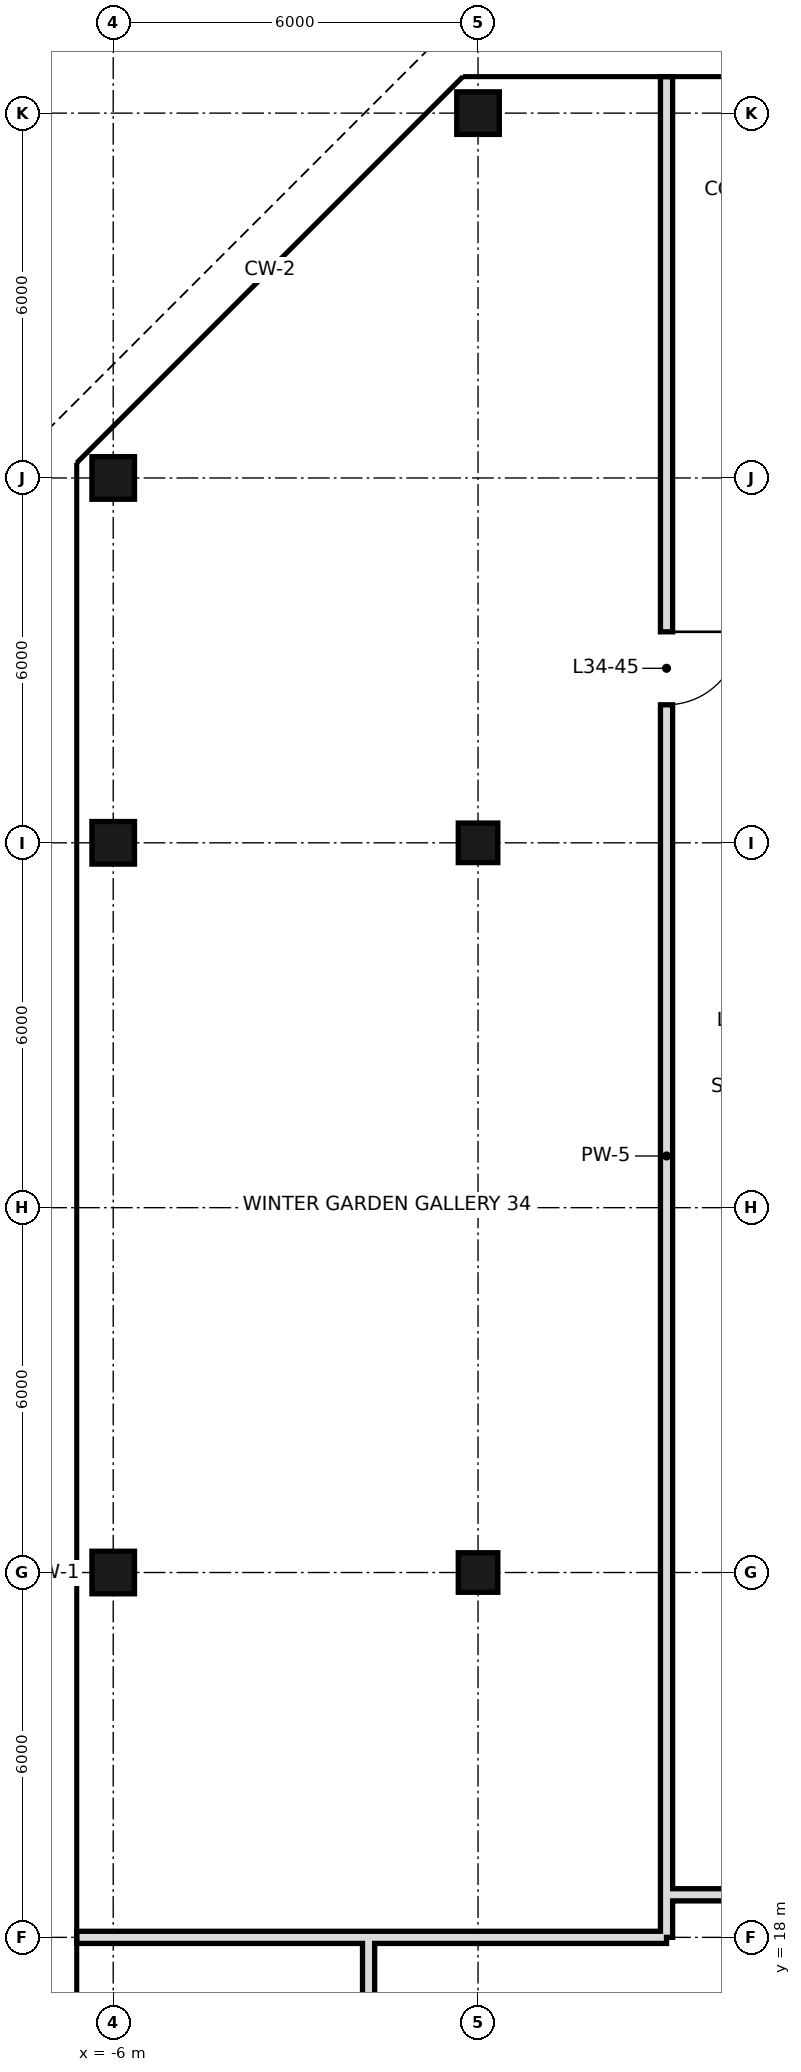
"""IFC4 building model, lengths in metres.
Left out: names, types, materials, properties, quantities, classifications, styles, units other than length and angle.
Written with IfcOpenShell. Run it as: python <this file> out.ifc"""

import sys

from ifc_helpers import new_model, si_unit, direction, frame, frame_2d, origin, origin_2d, place, context, subcontext, project, spatial, rectangle, hollow_rectangle, extrude, element, fill, save


model = new_model("IFC4")
c1 = context("Model", 3, precision=1e-05, world=origin(), true_north=direction((0.0, 1.0)))
c2 = subcontext(c1, "Body", "Model", "MODEL_VIEW")
j1 = project(units=[si_unit("LENGTHUNIT", "METRE"), si_unit("PLANEANGLEUNIT", "RADIAN")], contexts=[c1])
p1 = place(None, origin())
s1 = spatial("IfcSite", under=j1, at=p1, CompositionType="ELEMENT")
p2 = place(p1, origin())
s2 = spatial("IfcBuilding", under=s1, at=p2, CompositionType="ELEMENT")
p3 = place(p2, frame((0.0, 0.0, 151.0)))
s3 = spatial("IfcBuildingStorey", under=s2, at=p3, CompositionType="ELEMENT", Elevation=151.0)
for number, where, z_axis, x_axis in (
    (1, (-6.0, 24.0, 0.0), (0.0, 0.0, 1.0), (1.0, 0.0, 0.0)),
    (2, (-6.0, 36.0, 0.0), (0.0, 0.0, 1.0), (1.0, 0.0, 0.0)),
    (3, (-6.0, 42.0, 0.0), (0.0, 0.0, 1.0), (1.0, 0.0, 0.0)),
):
    element("IfcColumn", number, at=place(p3, frame(where, z_axis=z_axis, x_axis=x_axis)), inside=s3, PredefinedType="COLUMN", context=c2, shape_type="SweptSolid", body=[
        extrude(hollow_rectangle(XDim=0.7, YDim=0.7, WallThickness=0.036, at=origin_2d()), origin(), (0.0, 0.0, 1.0), 3.6),
    ])
for number, where, z_axis, x_axis in (
    (4, (0.0, 24.0, 0.0), (0.0, 0.0, 1.0), (1.0, 0.0, 0.0)),
    (5, (0.0, 36.0, 0.0), (0.0, 0.0, 1.0), (1.0, 0.0, 0.0)),
):
    element("IfcColumn", number, at=place(p3, frame(where, z_axis=z_axis, x_axis=x_axis)), inside=s3, PredefinedType="COLUMN", context=c2, shape_type="SweptSolid", body=[
        extrude(hollow_rectangle(XDim=0.65, YDim=0.65, WallThickness=0.032, at=origin_2d()), origin(), (0.0, 0.0, 1.0), 3.6),
    ])
p4 = place(p3, frame((0.0, 48.0, 0.0), z_axis=(0.0, 0.0, 1.0), x_axis=(1.0, 0.0, 0.0)))
e6 = element("IfcColumn", 6, at=p4, inside=s3, PredefinedType="COLUMN", context=c2, shape_type="SweptSolid", body=[
    extrude(hollow_rectangle(XDim=0.7, YDim=0.7, WallThickness=0.036, at=origin_2d()), origin(), (0.0, 0.0, 1.0), 3.6),
])
p5 = place(p3, frame((-1.8, 10.8, 0.0), z_axis=(0.0, 0.0, 1.0), x_axis=(0.0, 1.0, 0.0)))
e7 = element("IfcWall", 7, at=p5, inside=s3, PredefinedType="SOLIDWALL", context=c2, shape_type="SweptSolid", body=[
    extrude(rectangle(XDim=7.2, YDim=0.2, at=frame_2d((3.6, 0.0))), origin(), (0.0, 0.0, 1.0), 3.42),
])
p6 = place(p3, frame((3.1, 18.0, 0.0), z_axis=(0.0, 0.0, 1.0), x_axis=(0.0, 1.0, 0.0)))
e8 = element("IfcWall", 8, at=p6, inside=s3, PredefinedType="SOLIDWALL", context=c2, shape_type="SweptSolid", body=[
    extrude(rectangle(XDim=30.6, YDim=0.2, at=frame_2d((15.3, 0.0))), origin(), (0.0, 0.0, 1.0), 2.72),
])
p7 = place(p6, frame((20.27, 0.0, 0.0)))
e9 = element("IfcOpeningElement", 9, at=p7, cuts=e8, PredefinedType="OPENING", context=c2, shape_type="SweptSolid", body=[
    extrude(rectangle(XDim=1.2, YDim=2.4, at=frame_2d((0.6, 1.2))), frame((0.0, 0.11, 0.0), z_axis=(0.0, -1.0, 0.0), x_axis=(1.0, 0.0, 0.0)), (0.0, 0.0, 1.0), 0.22),
])
p8 = place(p3, frame((-1.8, 18.0, 0.0), z_axis=(0.0, 0.0, 1.0), x_axis=(1.0, 0.0, 0.0)))
e10 = element("IfcWall", 10, at=p8, inside=s3, PredefinedType="SOLIDWALL", context=c2, shape_type="SweptSolid", body=[
    extrude(rectangle(XDim=4.9, YDim=0.2, at=frame_2d((2.45, 0.0))), origin(), (0.0, 0.0, 1.0), 2.72),
])
p9 = place(p3, frame((-6.6, 18.0, 0.0), z_axis=(0.0, 0.0, 1.0), x_axis=(1.0, 0.0, 0.0)))
e11 = element("IfcWall", 11, at=p9, inside=s3, PredefinedType="SOLIDWALL", context=c2, shape_type="SweptSolid", body=[
    extrude(rectangle(XDim=4.8, YDim=0.2, at=frame_2d((2.4, 0.0))), origin(), (0.0, 0.0, 1.0), 2.72),
])
p10 = place(p3, frame((3.1, 18.7, 0.0), z_axis=(0.0, 0.0, 1.0), x_axis=(1.0, 0.0, 0.0)))
e12 = element("IfcWall", 12, at=p10, inside=s3, PredefinedType="SOLIDWALL", context=c2, shape_type="SweptSolid", body=[
    extrude(rectangle(XDim=41.8, YDim=0.2, at=frame_2d((20.9, 0.0))), origin(), (0.0, 0.0, 1.0), 2.72),
])
p11 = place(p10, frame((5.64, 0.0, 0.0)))
e13 = element("IfcOpeningElement", 13, at=p11, cuts=e12, PredefinedType="OPENING", context=c2, shape_type="SweptSolid", body=[
    extrude(rectangle(XDim=1.2, YDim=2.4, at=frame_2d((0.6, 1.2))), frame((0.0, 0.11, 0.0), z_axis=(0.0, -1.0, 0.0), x_axis=(1.0, 0.0, 0.0)), (0.0, 0.0, 1.0), 0.22),
])
p12 = place(p10, frame((24.16, 0.0, 0.0)))
e14 = element("IfcOpeningElement", 14, at=p12, cuts=e12, PredefinedType="OPENING", context=c2, shape_type="SweptSolid", body=[
    extrude(rectangle(XDim=1.2, YDim=2.4, at=frame_2d((0.6, 1.2))), frame((0.0, 0.11, 0.0), z_axis=(0.0, -1.0, 0.0), x_axis=(1.0, 0.0, 0.0)), (0.0, 0.0, 1.0), 0.22),
])
p13 = place(p7, origin())
e15 = element("IfcDoor", 15, at=p13, inside=s3, OperationType="SINGLE_SWING_RIGHT", PredefinedType="DOOR", context=c2, shape_type="SweptSolid", body=[
    extrude(rectangle(XDim=1.2, YDim=2.4, at=frame_2d((0.6, 1.2))), frame((0.0, 0.025, 0.0), z_axis=(0.0, -1.0, 0.0), x_axis=(1.0, 0.0, 0.0)), (0.0, 0.0, 1.0), 0.05),
])
fill(e9, e15)
save(model, sys.argv[1])
